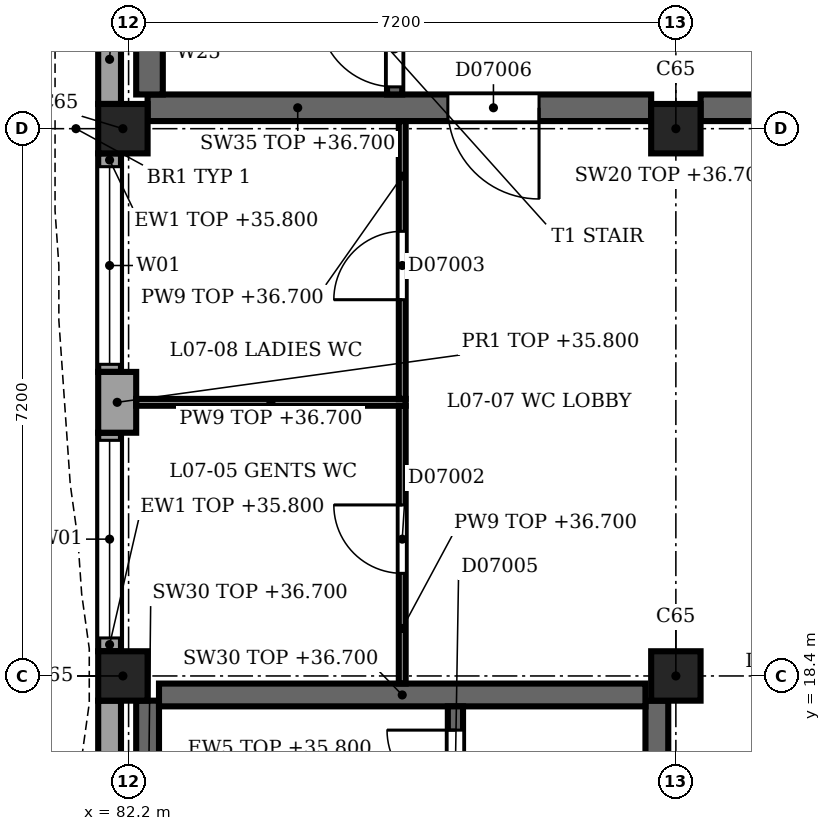
"""IFC4 building model, lengths in metres.
Left out: names, types, materials, properties, quantities, classifications, styles, units other than length and angle.
Written with IfcOpenShell. Run it as: python <this file> out.ifc"""

import sys

from ifc_helpers import new_model, si_unit, direction, frame, frame_2d, origin, origin_2d, place, context, subcontext, project, spatial, rectangle, extrude, element, fill, save


model = new_model("IFC4")
c1 = context("Model", 3, precision=1e-05, world=origin(), true_north=direction((0.0, 1.0)))
c2 = subcontext(c1, "Body", "Model", "MODEL_VIEW")
j1 = project(units=[si_unit("LENGTHUNIT", "METRE"), si_unit("PLANEANGLEUNIT", "RADIAN")], contexts=[c1])
p1 = place(None, origin())
s1 = spatial("IfcSite", under=j1, at=p1, CompositionType="ELEMENT")
p2 = place(p1, origin())
s2 = spatial("IfcBuilding", under=s1, at=p2, CompositionType="ELEMENT")
p3 = place(p2, frame((0.0, 0.0, 32.4)))
s3 = spatial("IfcBuildingStorey", under=s2, at=p3, CompositionType="ELEMENT", Elevation=32.4)
for number, where, z_axis, x_axis in (
    (1, (82.125, 18.4, 0.0), (0.0, 0.0, 1.0), (1.0, 0.0, 0.0)),
    (2, (82.125, 25.6, 0.0), (0.0, 0.0, 1.0), (1.0, 0.0, 0.0)),
    (3, (89.4, 18.4, 0.0), (0.0, 0.0, 1.0), (1.0, 0.0, 0.0)),
    (4, (89.4, 25.6, 0.0), (0.0, 0.0, 1.0), (1.0, 0.0, 0.0)),
):
    element("IfcColumn", number, at=place(p3, frame(where, z_axis=z_axis, x_axis=x_axis)), inside=s3, PredefinedType="COLUMN", context=c2, shape_type="SweptSolid", body=[
        extrude(rectangle(XDim=0.65, YDim=0.65, at=origin_2d()), origin(), (0.0, 0.0, 1.0), 4.5),
    ])
p4 = place(p3, frame((82.05, 21.6, 0.0), z_axis=(0.0, 0.0, 1.0), x_axis=(0.0, 1.0, 0.0)))
e5 = element("IfcWall", 5, at=p4, inside=s3, PredefinedType="SOLIDWALL", context=c2, shape_type="SweptSolid", body=[
    extrude(rectangle(XDim=0.8, YDim=0.5, at=frame_2d((0.4, 0.0))), origin(), (0.0, 0.0, 1.0), 3.4),
])
p5 = place(p3, frame((81.95, 15.2, 0.0), z_axis=(0.0, 0.0, 1.0), x_axis=(0.0, 1.0, 0.0)))
e6 = element("IfcWall", 6, at=p5, inside=s3, PredefinedType="SOLIDWALL", context=c2, shape_type="SweptSolid", body=[
    extrude(rectangle(XDim=2.875, YDim=0.3, at=frame_2d((1.438, 0.0))), origin(), (0.0, 0.0, 1.0), 3.4),
])
p6 = place(p3, frame((81.95, 18.725, 0.0), z_axis=(0.0, 0.0, 1.0), x_axis=(0.0, 1.0, 0.0)))
e7 = element("IfcWall", 7, at=p6, inside=s3, PredefinedType="SOLIDWALL", context=c2, shape_type="SweptSolid", body=[
    extrude(rectangle(XDim=2.875, YDim=0.3, at=frame_2d((1.438, 0.0))), origin(), (0.0, 0.0, 1.0), 3.4),
])
p7 = place(p6, frame((0.175, 0.0, 0.9)))
e8 = element("IfcOpeningElement", 8, at=p7, cuts=e7, PredefinedType="OPENING", context=c2, shape_type="SweptSolid", body=[
    extrude(rectangle(XDim=2.6, YDim=2.4, at=frame_2d((1.3, 1.2))), frame((0.0, 0.16, 0.0), z_axis=(0.0, -1.0, 0.0), x_axis=(1.0, 0.0, 0.0)), (0.0, 0.0, 1.0), 0.32),
])
p8 = place(p3, frame((81.95, 22.4, 0.0), z_axis=(0.0, 0.0, 1.0), x_axis=(0.0, 1.0, 0.0)))
e9 = element("IfcWall", 9, at=p8, inside=s3, PredefinedType="SOLIDWALL", context=c2, shape_type="SweptSolid", body=[
    extrude(rectangle(XDim=2.875, YDim=0.3, at=frame_2d((1.438, 0.0))), origin(), (0.0, 0.0, 1.0), 3.4),
])
p9 = place(p8, frame((0.1, 0.0, 0.9)))
e10 = element("IfcOpeningElement", 10, at=p9, cuts=e9, PredefinedType="OPENING", context=c2, shape_type="SweptSolid", body=[
    extrude(rectangle(XDim=2.6, YDim=2.4, at=frame_2d((1.3, 1.2))), frame((0.0, 0.16, 0.0), z_axis=(0.0, -1.0, 0.0), x_axis=(1.0, 0.0, 0.0)), (0.0, 0.0, 1.0), 0.32),
])
p10 = place(p3, frame((81.95, 25.925, 0.0), z_axis=(0.0, 0.0, 1.0), x_axis=(0.0, 1.0, 0.0)))
e11 = element("IfcWall", 11, at=p10, inside=s3, PredefinedType="SOLIDWALL", context=c2, shape_type="SweptSolid", body=[
    extrude(rectangle(XDim=2.875, YDim=0.3, at=frame_2d((1.438, 0.0))), origin(), (0.0, 0.0, 1.0), 3.4),
])
p11 = place(p10, frame((1.175, 0.0, 1.2)))
e12 = element("IfcOpeningElement", 12, at=p11, cuts=e11, PredefinedType="OPENING", context=c2, shape_type="SweptSolid", body=[
    extrude(rectangle(XDim=0.6, YDim=1.8, at=frame_2d((0.3, 0.9))), frame((0.0, 0.16, 0.0), z_axis=(0.0, -1.0, 0.0), x_axis=(1.0, 0.0, 0.0)), (0.0, 0.0, 1.0), 0.32),
])
p12 = place(p3, frame((82.45, 25.875, 0.0), z_axis=(0.0, 0.0, 1.0), x_axis=(1.0, 0.0, 0.0)))
e13 = element("IfcWall", 13, at=p12, inside=s3, PredefinedType="SHEAR", context=c2, shape_type="SweptSolid", body=[
    extrude(rectangle(XDim=6.625, YDim=0.35, at=frame_2d((3.312, 0.0))), origin(), (0.0, 0.0, 1.0), 4.3),
])
p13 = place(p12, frame((3.95, 0.0, 0.0)))
e14 = element("IfcOpeningElement", 14, at=p13, cuts=e13, PredefinedType="OPENING", context=c2, shape_type="SweptSolid", body=[
    extrude(rectangle(XDim=1.2, YDim=2.1, at=frame_2d((0.6, 1.05))), frame((0.0, 0.185, 0.0), z_axis=(0.0, -1.0, 0.0), x_axis=(1.0, 0.0, 0.0)), (0.0, 0.0, 1.0), 0.37),
])
p14 = place(p3, frame((89.725, 25.875, 0.0), z_axis=(0.0, 0.0, 1.0), x_axis=(1.0, 0.0, 0.0)))
e15 = element("IfcWall", 15, at=p14, inside=s3, PredefinedType="SHEAR", context=c2, shape_type="SweptSolid", body=[
    extrude(rectangle(XDim=6.55, YDim=0.35, at=frame_2d((3.275, 0.0))), origin(), (0.0, 0.0, 1.0), 4.3),
])
p15 = place(p14, frame((2.675, 0.0, 0.0)))
e16 = element("IfcOpeningElement", 16, at=p15, cuts=e15, PredefinedType="OPENING", context=c2, shape_type="SweptSolid", body=[
    extrude(rectangle(XDim=1.8, YDim=2.1, at=frame_2d((0.9, 1.05))), frame((0.0, 0.185, 0.0), z_axis=(0.0, -1.0, 0.0), x_axis=(1.0, 0.0, 0.0)), (0.0, 0.0, 1.0), 0.37),
])
p16 = place(p3, frame((82.475, 26.05, 0.0), z_axis=(0.0, 0.0, 1.0), x_axis=(0.0, 1.0, 0.0)))
e17 = element("IfcWall", 17, at=p16, inside=s3, PredefinedType="SHEAR", context=c2, shape_type="SweptSolid", body=[
    extrude(rectangle(XDim=6.3, YDim=0.35, at=frame_2d((3.15, 0.0))), origin(), (0.0, 0.0, 1.0), 4.3),
])
p17 = place(p16, frame((1.05, 0.0, 1.2)))
e18 = element("IfcOpeningElement", 18, at=p17, cuts=e17, PredefinedType="OPENING", context=c2, shape_type="SweptSolid", body=[
    extrude(rectangle(XDim=0.6, YDim=1.8, at=frame_2d((0.3, 0.9))), frame((0.0, 0.185, 0.0), z_axis=(0.0, -1.0, 0.0), x_axis=(1.0, 0.0, 0.0)), (0.0, 0.0, 1.0), 0.37),
])
p18 = place(p16, frame((4.65, 0.0, 1.2)))
e19 = element("IfcOpeningElement", 19, at=p18, cuts=e17, PredefinedType="OPENING", context=c2, shape_type="SweptSolid", body=[
    extrude(rectangle(XDim=0.6, YDim=1.8, at=frame_2d((0.3, 0.9))), frame((0.0, 0.185, 0.0), z_axis=(0.0, -1.0, 0.0), x_axis=(1.0, 0.0, 0.0)), (0.0, 0.0, 1.0), 0.37),
])
p19 = place(p3, frame((85.7, 26.05, 0.0), z_axis=(0.0, 0.0, 1.0), x_axis=(0.0, 1.0, 0.0)))
e20 = element("IfcWall", 20, at=p19, inside=s3, PredefinedType="SHEAR", context=c2, shape_type="SweptSolid", body=[
    extrude(rectangle(XDim=6.3, YDim=0.2, at=frame_2d((3.15, 0.0))), origin(), (0.0, 0.0, 1.0), 4.3),
])
p20 = place(p19, frame((0.1, 0.0, 0.0)))
e21 = element("IfcOpeningElement", 21, at=p20, cuts=e20, PredefinedType="OPENING", context=c2, shape_type="SweptSolid", body=[
    extrude(rectangle(XDim=1.0, YDim=2.1, at=frame_2d((0.5, 1.05))), frame((0.0, 0.11, 0.0), z_axis=(0.0, -1.0, 0.0), x_axis=(1.0, 0.0, 0.0)), (0.0, 0.0, 1.0), 0.22),
])
p21 = place(p3, frame((89.15, 11.525, 0.0), z_axis=(0.0, 0.0, 1.0), x_axis=(0.0, 1.0, 0.0)))
e22 = element("IfcWall", 22, at=p21, inside=s3, PredefinedType="SHEAR", context=c2, shape_type="SweptSolid", body=[
    extrude(rectangle(XDim=6.55, YDim=0.3, at=frame_2d((3.275, 0.0))), origin(), (0.0, 0.0, 1.0), 4.3),
])
p22 = place(p21, frame((4.275, 0.0, 0.0)))
e23 = element("IfcOpeningElement", 23, at=p22, cuts=e22, PredefinedType="OPENING", context=c2, shape_type="SweptSolid", body=[
    extrude(rectangle(XDim=1.2, YDim=2.1, at=frame_2d((0.6, 1.05))), frame((0.0, 0.16, 0.0), z_axis=(0.0, -1.0, 0.0), x_axis=(1.0, 0.0, 0.0)), (0.0, 0.0, 1.0), 0.32),
])
p23 = place(p3, frame((82.45, 11.525, 0.0), z_axis=(0.0, 0.0, 1.0), x_axis=(0.0, 1.0, 0.0)))
e24 = element("IfcWall", 24, at=p23, inside=s3, PredefinedType="SHEAR", context=c2, shape_type="SweptSolid", body=[
    extrude(rectangle(XDim=6.55, YDim=0.3, at=frame_2d((3.275, 0.0))), origin(), (0.0, 0.0, 1.0), 4.3),
])
p24 = place(p23, frame((1.175, 0.0, 1.2)))
e25 = element("IfcOpeningElement", 25, at=p24, cuts=e24, PredefinedType="OPENING", context=c2, shape_type="SweptSolid", body=[
    extrude(rectangle(XDim=0.6, YDim=1.8, at=frame_2d((0.3, 0.9))), frame((0.0, 0.16, 0.0), z_axis=(0.0, -1.0, 0.0), x_axis=(1.0, 0.0, 0.0)), (0.0, 0.0, 1.0), 0.32),
])
p25 = place(p3, frame((82.6, 18.15, 0.0), z_axis=(0.0, 0.0, 1.0), x_axis=(1.0, 0.0, 0.0)))
e26 = element("IfcWall", 26, at=p25, inside=s3, PredefinedType="SHEAR", context=c2, shape_type="SweptSolid", body=[
    extrude(rectangle(XDim=6.4, YDim=0.3, at=frame_2d((3.2, 0.0))), origin(), (0.0, 0.0, 1.0), 4.3),
])
p26 = place(p3, frame((86.5, 18.0, 0.0), z_axis=(0.0, 0.0, 1.0), x_axis=(0.0, -1.0, 0.0)))
e27 = element("IfcWall", 27, at=p26, inside=s3, PredefinedType="SHEAR", context=c2, shape_type="SweptSolid", body=[
    extrude(rectangle(XDim=3.25, YDim=0.2, at=frame_2d((1.625, 0.0))), origin(), (0.0, 0.0, 1.0), 4.3),
])
p27 = place(p26, frame((2.038, 0.0, 0.0)))
e28 = element("IfcOpeningElement", 28, at=p27, cuts=e27, PredefinedType="OPENING", context=c2, shape_type="SweptSolid", body=[
    extrude(rectangle(XDim=0.9, YDim=2.1, at=frame_2d((0.45, 1.05))), frame((0.0, 0.11, 0.0), z_axis=(0.0, -1.0, 0.0), x_axis=(1.0, 0.0, 0.0)), (0.0, 0.0, 1.0), 0.22),
])
p28 = place(p26, frame((0.312, 0.0, 0.0)))
e29 = element("IfcOpeningElement", 29, at=p28, cuts=e27, PredefinedType="OPENING", context=c2, shape_type="SweptSolid", body=[
    extrude(rectangle(XDim=0.9, YDim=2.1, at=frame_2d((0.45, 1.05))), frame((0.0, 0.11, 0.0), z_axis=(0.0, -1.0, 0.0), x_axis=(1.0, 0.0, 0.0)), (0.0, 0.0, 1.0), 0.22),
])
p29 = place(p3, frame((82.3, 22.0, 0.0), z_axis=(0.0, 0.0, 1.0), x_axis=(1.0, 0.0, 0.0)))
e30 = element("IfcWall", 30, at=p29, inside=s3, PredefinedType="PARTITIONING", context=c2, shape_type="SweptSolid", body=[
    extrude(rectangle(XDim=3.545, YDim=0.09, at=frame_2d((1.772, 0.0))), origin(), (0.0, 0.0, 1.0), 4.3),
])
p30 = place(p3, frame((85.8, 18.3, 0.0), z_axis=(0.0, 0.0, 1.0), x_axis=(0.0, 1.0, 0.0)))
e31 = element("IfcWall", 31, at=p30, inside=s3, PredefinedType="PARTITIONING", context=c2, shape_type="SweptSolid", body=[
    extrude(rectangle(XDim=3.655, YDim=0.09, at=frame_2d((1.828, 0.0))), origin(), (0.0, 0.0, 1.0), 4.3),
])
p31 = place(p30, frame((1.45, 0.0, 0.0)))
e32 = element("IfcOpeningElement", 32, at=p31, cuts=e31, PredefinedType="OPENING", context=c2, shape_type="SweptSolid", body=[
    extrude(rectangle(XDim=0.9, YDim=2.1, at=frame_2d((0.45, 1.05))), frame((0.0, 0.055, 0.0), z_axis=(0.0, -1.0, 0.0), x_axis=(1.0, 0.0, 0.0)), (0.0, 0.0, 1.0), 0.11),
])
p32 = place(p3, frame((85.8, 22.045, 0.0), z_axis=(0.0, 0.0, 1.0), x_axis=(0.0, 1.0, 0.0)))
e33 = element("IfcWall", 33, at=p32, inside=s3, PredefinedType="PARTITIONING", context=c2, shape_type="SweptSolid", body=[
    extrude(rectangle(XDim=3.655, YDim=0.09, at=frame_2d((1.828, 0.0))), origin(), (0.0, 0.0, 1.0), 4.3),
])
p33 = place(p32, frame((1.305, 0.0, 0.0)))
e34 = element("IfcOpeningElement", 34, at=p33, cuts=e33, PredefinedType="OPENING", context=c2, shape_type="SweptSolid", body=[
    extrude(rectangle(XDim=0.9, YDim=2.1, at=frame_2d((0.45, 1.05))), frame((0.0, 0.055, 0.0), z_axis=(0.0, -1.0, 0.0), x_axis=(1.0, 0.0, 0.0)), (0.0, 0.0, 1.0), 0.11),
])
p34 = place(p7, origin())
e35 = element("IfcWindow", 35, at=p34, inside=s3, PartitioningType="SINGLE_PANEL", PredefinedType="WINDOW", context=c2, shape_type="SweptSolid", body=[
    extrude(rectangle(XDim=2.6, YDim=2.4, at=frame_2d((1.3, 1.2))), frame((0.0, 0.03, 0.0), z_axis=(0.0, -1.0, 0.0), x_axis=(1.0, 0.0, 0.0)), (0.0, 0.0, 1.0), 0.06),
])
fill(e8, e35)
p35 = place(p9, origin())
e36 = element("IfcWindow", 36, at=p35, inside=s3, PartitioningType="SINGLE_PANEL", PredefinedType="WINDOW", context=c2, shape_type="SweptSolid", body=[
    extrude(rectangle(XDim=2.6, YDim=2.4, at=frame_2d((1.3, 1.2))), frame((0.0, 0.03, 0.0), z_axis=(0.0, -1.0, 0.0), x_axis=(1.0, 0.0, 0.0)), (0.0, 0.0, 1.0), 0.06),
])
fill(e10, e36)
p36 = place(p13, origin())
e37 = element("IfcDoor", 37, at=p36, inside=s3, OperationType="SINGLE_SWING_RIGHT", PredefinedType="DOOR", context=c2, shape_type="SweptSolid", body=[
    extrude(rectangle(XDim=1.2, YDim=2.1, at=frame_2d((0.6, 1.05))), frame((0.0, 0.025, 0.0), z_axis=(0.0, -1.0, 0.0), x_axis=(1.0, 0.0, 0.0)), (0.0, 0.0, 1.0), 0.05),
])
fill(e14, e37)
p37 = place(p20, origin())
e38 = element("IfcDoor", 38, at=p37, inside=s3, OperationType="SINGLE_SWING_LEFT", PredefinedType="DOOR", context=c2, shape_type="SweptSolid", body=[
    extrude(rectangle(XDim=1.0, YDim=2.1, at=frame_2d((0.5, 1.05))), frame((0.0, 0.025, 0.0), z_axis=(0.0, -1.0, 0.0), x_axis=(1.0, 0.0, 0.0)), (0.0, 0.0, 1.0), 0.05),
])
fill(e21, e38)
p38 = place(p28, origin())
e39 = element("IfcDoor", 39, at=p38, inside=s3, OperationType="SINGLE_SWING_LEFT", PredefinedType="DOOR", context=c2, shape_type="SweptSolid", body=[
    extrude(rectangle(XDim=0.9, YDim=2.1, at=frame_2d((0.45, 1.05))), frame((0.0, 0.025, 0.0), z_axis=(0.0, -1.0, 0.0), x_axis=(1.0, 0.0, 0.0)), (0.0, 0.0, 1.0), 0.05),
])
fill(e29, e39)
p39 = place(p31, origin())
e40 = element("IfcDoor", 40, at=p39, inside=s3, OperationType="SINGLE_SWING_RIGHT", PredefinedType="DOOR", context=c2, shape_type="SweptSolid", body=[
    extrude(rectangle(XDim=0.9, YDim=2.1, at=frame_2d((0.45, 1.05))), frame((0.0, 0.025, 0.0), z_axis=(0.0, -1.0, 0.0), x_axis=(1.0, 0.0, 0.0)), (0.0, 0.0, 1.0), 0.05),
])
fill(e32, e40)
p40 = place(p33, origin())
e41 = element("IfcDoor", 41, at=p40, inside=s3, OperationType="SINGLE_SWING_LEFT", PredefinedType="DOOR", context=c2, shape_type="SweptSolid", body=[
    extrude(rectangle(XDim=0.9, YDim=2.1, at=frame_2d((0.45, 1.05))), frame((0.0, 0.025, 0.0), z_axis=(0.0, -1.0, 0.0), x_axis=(1.0, 0.0, 0.0)), (0.0, 0.0, 1.0), 0.05),
])
fill(e34, e41)
save(model, sys.argv[1])
